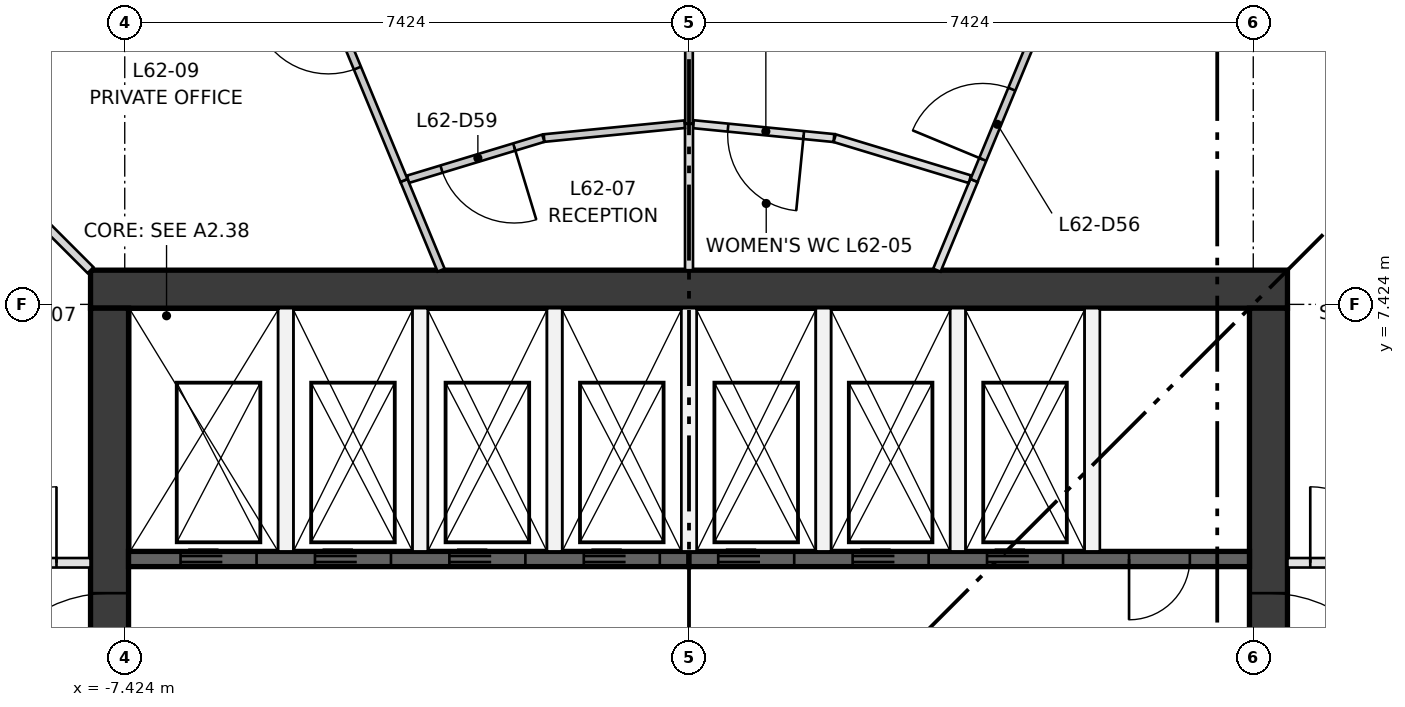
"""IFC4 building model, lengths in metres.
Left out: names, types, materials, properties, quantities, classifications, styles, units other than length and angle.
Written with IfcOpenShell. Run it as: python <this file> out.ifc"""

import sys

from ifc_helpers import new_model, si_unit, direction, frame, frame_2d, origin, place, context, subcontext, project, spatial, rectangle, extrude, element, fill, save


model = new_model("IFC4")
c1 = context("Model", 3, precision=1e-05, world=origin(), true_north=direction((0.0, 1.0)))
c2 = subcontext(c1, "Body", "Model", "MODEL_VIEW")
j1 = project(units=[si_unit("LENGTHUNIT", "METRE"), si_unit("PLANEANGLEUNIT", "RADIAN")], contexts=[c1])
p1 = place(None, origin())
s1 = spatial("IfcSite", under=j1, at=p1, CompositionType="ELEMENT")
p2 = place(p1, origin())
s2 = spatial("IfcBuilding", under=s1, at=p2, CompositionType="ELEMENT")
p3 = place(p2, frame((0.0, 0.0, 227.85)))
s3 = spatial("IfcBuildingStorey", under=s2, at=p3, CompositionType="ELEMENT", Elevation=227.85)
p4 = place(p3, frame((-7.874, 7.624, 0.0), z_axis=(0.0, 0.0, 1.0), x_axis=(1.0, 0.0, 0.0)))
e1 = element("IfcWall", 1, at=p4, inside=s3, PredefinedType="SHEAR", context=c2, shape_type="SweptSolid", body=[
    extrude(rectangle(XDim=15.748, YDim=0.5, at=frame_2d((7.874, 0.0))), origin(), (0.0, 0.0, 1.0), 3.35),
])
p5 = place(p3, frame((-7.624, -7.374, 0.0), z_axis=(0.0, 0.0, 1.0), x_axis=(0.0, 1.0, 0.0)))
e2 = element("IfcWall", 2, at=p5, inside=s3, PredefinedType="SHEAR", context=c2, shape_type="SweptSolid", body=[
    extrude(rectangle(XDim=14.748, YDim=0.5, at=frame_2d((7.374, 0.0))), origin(), (0.0, 0.0, 1.0), 3.35),
])
p6 = place(p5, frame((6.874, 0.0, 0.0)))
e3 = element("IfcOpeningElement", 3, at=p6, cuts=e2, PredefinedType="OPENING", context=c2, shape_type="SweptSolid", body=[
    extrude(rectangle(XDim=1.0, YDim=2.1, at=frame_2d((0.5, 1.05))), frame((0.0, 0.26, 0.0), z_axis=(0.0, -1.0, 0.0), x_axis=(1.0, 0.0, 0.0)), (0.0, 0.0, 1.0), 0.52),
])
p7 = place(p5, frame((3.75, 0.0, 0.0)))
e4 = element("IfcOpeningElement", 4, at=p7, cuts=e2, PredefinedType="OPENING", context=c2, shape_type="SweptSolid", body=[
    extrude(rectangle(XDim=1.8, YDim=2.1, at=frame_2d((0.9, 1.05))), frame((0.0, 0.26, 0.0), z_axis=(0.0, -1.0, 0.0), x_axis=(1.0, 0.0, 0.0)), (0.0, 0.0, 1.0), 0.52),
])
p8 = place(p5, frame((9.198, 0.0, 0.0)))
e5 = element("IfcOpeningElement", 5, at=p8, cuts=e2, PredefinedType="OPENING", context=c2, shape_type="SweptSolid", body=[
    extrude(rectangle(XDim=1.8, YDim=2.1, at=frame_2d((0.9, 1.05))), frame((0.0, 0.26, 0.0), z_axis=(0.0, -1.0, 0.0), x_axis=(1.0, 0.0, 0.0)), (0.0, 0.0, 1.0), 0.52),
])
p9 = place(p3, frame((7.624, -7.374, 0.0), z_axis=(0.0, 0.0, 1.0), x_axis=(0.0, 1.0, 0.0)))
e6 = element("IfcWall", 6, at=p9, inside=s3, PredefinedType="SHEAR", context=c2, shape_type="SweptSolid", body=[
    extrude(rectangle(XDim=14.748, YDim=0.5, at=frame_2d((7.374, 0.0))), origin(), (0.0, 0.0, 1.0), 3.35),
])
p10 = place(p9, frame((6.874, 0.0, 0.0)))
e7 = element("IfcOpeningElement", 7, at=p10, cuts=e6, PredefinedType="OPENING", context=c2, shape_type="SweptSolid", body=[
    extrude(rectangle(XDim=1.0, YDim=2.1, at=frame_2d((0.5, 1.05))), frame((0.0, 0.26, 0.0), z_axis=(0.0, -1.0, 0.0), x_axis=(1.0, 0.0, 0.0)), (0.0, 0.0, 1.0), 0.52),
])
p11 = place(p9, frame((3.75, 0.0, 0.0)))
e8 = element("IfcOpeningElement", 8, at=p11, cuts=e6, PredefinedType="OPENING", context=c2, shape_type="SweptSolid", body=[
    extrude(rectangle(XDim=1.8, YDim=2.1, at=frame_2d((0.9, 1.05))), frame((0.0, 0.26, 0.0), z_axis=(0.0, -1.0, 0.0), x_axis=(1.0, 0.0, 0.0)), (0.0, 0.0, 1.0), 0.52),
])
p12 = place(p9, frame((9.198, 0.0, 0.0)))
e9 = element("IfcOpeningElement", 9, at=p12, cuts=e6, PredefinedType="OPENING", context=c2, shape_type="SweptSolid", body=[
    extrude(rectangle(XDim=1.8, YDim=2.1, at=frame_2d((0.9, 1.05))), frame((0.0, 0.26, 0.0), z_axis=(0.0, -1.0, 0.0), x_axis=(1.0, 0.0, 0.0)), (0.0, 0.0, 1.0), 0.52),
])
p13 = place(p3, frame((-7.374, 4.074, 0.0), z_axis=(0.0, 0.0, 1.0), x_axis=(1.0, 0.0, 0.0)))
e10 = element("IfcWall", 10, at=p13, inside=s3, PredefinedType="SHEAR", context=c2, shape_type="SweptSolid", body=[
    extrude(rectangle(XDim=7.374, YDim=0.2, at=frame_2d((3.687, 0.0))), origin(), (0.0, 0.0, 1.0), 3.0),
])
p14 = place(p13, frame((0.684, 0.0, 0.0)))
e11 = element("IfcOpeningElement", 11, at=p14, cuts=e10, PredefinedType="OPENING", context=c2, shape_type="SweptSolid", body=[
    extrude(rectangle(XDim=1.0, YDim=2.1, at=frame_2d((0.5, 1.05))), frame((0.0, 0.11, 0.0), z_axis=(0.0, -1.0, 0.0), x_axis=(1.0, 0.0, 0.0)), (0.0, 0.0, 1.0), 0.22),
])
p15 = place(p13, frame((2.453, 0.0, 0.0)))
e12 = element("IfcOpeningElement", 12, at=p15, cuts=e10, PredefinedType="OPENING", context=c2, shape_type="SweptSolid", body=[
    extrude(rectangle(XDim=1.0, YDim=2.1, at=frame_2d((0.5, 1.05))), frame((0.0, 0.11, 0.0), z_axis=(0.0, -1.0, 0.0), x_axis=(1.0, 0.0, 0.0)), (0.0, 0.0, 1.0), 0.22),
])
p16 = place(p13, frame((4.221, 0.0, 0.0)))
e13 = element("IfcOpeningElement", 13, at=p16, cuts=e10, PredefinedType="OPENING", context=c2, shape_type="SweptSolid", body=[
    extrude(rectangle(XDim=1.0, YDim=2.1, at=frame_2d((0.5, 1.05))), frame((0.0, 0.11, 0.0), z_axis=(0.0, -1.0, 0.0), x_axis=(1.0, 0.0, 0.0)), (0.0, 0.0, 1.0), 0.22),
])
p17 = place(p13, frame((5.99, 0.0, 0.0)))
e14 = element("IfcOpeningElement", 14, at=p17, cuts=e10, PredefinedType="OPENING", context=c2, shape_type="SweptSolid", body=[
    extrude(rectangle(XDim=1.0, YDim=2.1, at=frame_2d((0.5, 1.05))), frame((0.0, 0.11, 0.0), z_axis=(0.0, -1.0, 0.0), x_axis=(1.0, 0.0, 0.0)), (0.0, 0.0, 1.0), 0.22),
])
p18 = place(p3, frame((0.0, 4.074, 0.0), z_axis=(0.0, 0.0, 1.0), x_axis=(1.0, 0.0, 0.0)))
e15 = element("IfcWall", 15, at=p18, inside=s3, PredefinedType="SHEAR", context=c2, shape_type="SweptSolid", body=[
    extrude(rectangle(XDim=7.374, YDim=0.2, at=frame_2d((3.687, 0.0))), origin(), (0.0, 0.0, 1.0), 3.0),
])
p19 = place(p18, frame((0.384, 0.0, 0.0)))
e16 = element("IfcOpeningElement", 16, at=p19, cuts=e15, PredefinedType="OPENING", context=c2, shape_type="SweptSolid", body=[
    extrude(rectangle(XDim=1.0, YDim=2.1, at=frame_2d((0.5, 1.05))), frame((0.0, 0.11, 0.0), z_axis=(0.0, -1.0, 0.0), x_axis=(1.0, 0.0, 0.0)), (0.0, 0.0, 1.0), 0.22),
])
p20 = place(p18, frame((2.153, 0.0, 0.0)))
e17 = element("IfcOpeningElement", 17, at=p20, cuts=e15, PredefinedType="OPENING", context=c2, shape_type="SweptSolid", body=[
    extrude(rectangle(XDim=1.0, YDim=2.1, at=frame_2d((0.5, 1.05))), frame((0.0, 0.11, 0.0), z_axis=(0.0, -1.0, 0.0), x_axis=(1.0, 0.0, 0.0)), (0.0, 0.0, 1.0), 0.22),
])
p21 = place(p18, frame((3.921, 0.0, 0.0)))
e18 = element("IfcOpeningElement", 18, at=p21, cuts=e15, PredefinedType="OPENING", context=c2, shape_type="SweptSolid", body=[
    extrude(rectangle(XDim=1.0, YDim=2.1, at=frame_2d((0.5, 1.05))), frame((0.0, 0.11, 0.0), z_axis=(0.0, -1.0, 0.0), x_axis=(1.0, 0.0, 0.0)), (0.0, 0.0, 1.0), 0.22),
])
p22 = place(p18, frame((5.79, 0.0, 0.0)))
e19 = element("IfcOpeningElement", 19, at=p22, cuts=e15, PredefinedType="OPENING", context=c2, shape_type="SweptSolid", body=[
    extrude(rectangle(XDim=0.8, YDim=2.1, at=frame_2d((0.4, 1.05))), frame((0.0, 0.11, 0.0), z_axis=(0.0, -1.0, 0.0), x_axis=(1.0, 0.0, 0.0)), (0.0, 0.0, 1.0), 0.22),
])
for number, where, z_axis, x_axis in (
    (20, (-5.305, 4.174, 0.0), (0.0, 0.0, 1.0), (0.0, 1.0, 0.0)),
    (21, (-3.537, 4.174, 0.0), (0.0, 0.0, 1.0), (0.0, 1.0, 0.0)),
    (22, (-1.769, 4.174, 0.0), (0.0, 0.0, 1.0), (0.0, 1.0, 0.0)),
    (23, (0.0, 4.174, 0.0), (0.0, 0.0, 1.0), (0.0, 1.0, 0.0)),
    (24, (1.769, 4.174, 0.0), (0.0, 0.0, 1.0), (0.0, 1.0, 0.0)),
    (25, (3.537, 4.174, 0.0), (0.0, 0.0, 1.0), (0.0, 1.0, 0.0)),
    (26, (5.305, 4.174, 0.0), (0.0, 0.0, 1.0), (0.0, 1.0, 0.0)),
):
    element("IfcWall", number, at=place(p3, frame(where, z_axis=z_axis, x_axis=x_axis)), inside=s3, PredefinedType="PARTITIONING", context=c2, shape_type="SweptSolid", body=[
        extrude(rectangle(XDim=3.2, YDim=0.2, at=frame_2d((1.6, 0.0))), origin(), (0.0, 0.0, 1.0), 3.0),
    ])
for number, where, z_axis, x_axis in (
    (27, (10.07, 10.726, 0.0), (0.0, 0.0, 1.0), (-0.773, 0.634, 0.0)),
    (28, (-8.206, 12.254, 0.0), (0.0, 0.0, 1.0), (-0.773, -0.634, 0.0)),
):
    element("IfcWall", number, at=place(p3, frame(where, z_axis=z_axis, x_axis=x_axis)), inside=s3, PredefinedType="SOLIDWALL", context=c2, shape_type="SweptSolid", body=[
        extrude(rectangle(XDim=2.411, YDim=0.3, at=frame_2d((1.206, 0.0))), origin(), (0.0, 0.0, 1.0), 0.9),
    ])
p23 = place(p3, frame((7.874, 4.024, 0.0), z_axis=(0.0, 0.0, 1.0), x_axis=(1.0, 0.0, 0.0)))
e29 = element("IfcWall", 29, at=p23, inside=s3, PredefinedType="PARTITIONING", context=c2, shape_type="SweptSolid", body=[
    extrude(rectangle(XDim=2.159, YDim=0.125, at=frame_2d((1.08, 0.0))), origin(), (0.0, 0.0, 1.0), 3.0),
])
p24 = place(p23, frame((0.3, 0.0, 0.0)))
e30 = element("IfcOpeningElement", 30, at=p24, cuts=e29, PredefinedType="OPENING", context=c2, shape_type="SweptSolid", body=[
    extrude(rectangle(XDim=1.0, YDim=2.1, at=frame_2d((0.5, 1.05))), frame((0.0, 0.073, 0.0), z_axis=(0.0, -1.0, 0.0), x_axis=(1.0, 0.0, 0.0)), (0.0, 0.0, 1.0), 0.145),
])
p25 = place(p3, frame((-9.822, 4.024, 0.0), z_axis=(0.0, 0.0, 1.0), x_axis=(1.0, 0.0, 0.0)))
e31 = element("IfcWall", 31, at=p25, inside=s3, PredefinedType="PARTITIONING", context=c2, shape_type="SweptSolid", body=[
    extrude(rectangle(XDim=1.948, YDim=0.125, at=frame_2d((0.974, 0.0))), origin(), (0.0, 0.0, 1.0), 3.0),
])
p26 = place(p25, frame((0.5, 0.0, 0.0)))
e32 = element("IfcOpeningElement", 32, at=p26, cuts=e31, PredefinedType="OPENING", context=c2, shape_type="SweptSolid", body=[
    extrude(rectangle(XDim=1.0, YDim=2.1, at=frame_2d((0.5, 1.05))), frame((0.0, 0.073, 0.0), z_axis=(0.0, -1.0, 0.0), x_axis=(1.0, 0.0, 0.0)), (0.0, 0.0, 1.0), 0.145),
])
p27 = place(p3, frame((3.261, 7.874, 0.0), z_axis=(0.0, 0.0, 1.0), x_axis=(0.382700703766, 0.923872378273, 0.0)))
e33 = element("IfcWall", 33, at=p27, inside=s3, PredefinedType="PARTITIONING", context=c2, shape_type="SweptSolid", body=[
    extrude(rectangle(XDim=1.277, YDim=0.105, at=frame_2d((0.639, 0.0))), origin(), (0.0, 0.0, 1.0), 3.0),
])
p28 = place(p3, frame((3.75, 9.054, 0.0), z_axis=(0.0, 0.0, 1.0), x_axis=(0.382718911932, 0.923864835595, 0.0)))
e34 = element("IfcWall", 34, at=p28, inside=s3, PredefinedType="PARTITIONING", context=c2, shape_type="SweptSolid", body=[
    extrude(rectangle(XDim=4.17, YDim=0.1, at=frame_2d((2.085, 0.0))), origin(), (0.0, 0.0, 1.0), 3.0),
])
p29 = place(p28, frame((0.3, 0.0, 0.0)))
e35 = element("IfcOpeningElement", 35, at=p29, cuts=e34, PredefinedType="OPENING", context=c2, shape_type="SweptSolid", body=[
    extrude(rectangle(XDim=1.0, YDim=2.1, at=frame_2d((0.5, 1.05))), frame((0.0, 0.06, 0.0), z_axis=(0.0, -1.0, 0.0), x_axis=(1.0, 0.0, 0.0)), (0.0, 0.0, 1.0), 0.12),
])
p30 = place(p3, frame((1.907, 9.612, 0.0), z_axis=(0.0, 0.0, 1.0), x_axis=(-0.99519720103, 0.097890403323, 0.0)))
e36 = element("IfcWall", 36, at=p30, inside=s3, PredefinedType="PARTITIONING", context=c2, shape_type="SweptSolid", body=[
    extrude(rectangle(XDim=1.858, YDim=0.105, at=frame_2d((0.929, 0.0))), origin(), (0.0, 0.0, 1.0), 3.0),
])
p31 = place(p30, frame((0.4, 0.0, 0.0)))
e37 = element("IfcOpeningElement", 37, at=p31, cuts=e36, PredefinedType="OPENING", context=c2, shape_type="SweptSolid", body=[
    extrude(rectangle(XDim=1.0, YDim=2.1, at=frame_2d((0.5, 1.05))), frame((0.0, 0.062, 0.0), z_axis=(0.0, -1.0, 0.0), x_axis=(1.0, 0.0, 0.0)), (0.0, 0.0, 1.0), 0.125),
])
p32 = place(p3, frame((1.917, 9.61, 0.0), z_axis=(0.0, 0.0, 1.0), x_axis=(0.956950332284, -0.290251720996, 0.0)))
e38 = element("IfcWall", 38, at=p32, inside=s3, PredefinedType="PARTITIONING", context=c2, shape_type="SweptSolid", body=[
    extrude(rectangle(XDim=1.858, YDim=0.105, at=frame_2d((0.929, 0.0))), origin(), (0.0, 0.0, 1.0), 3.0),
])
p33 = place(p3, frame((0.0, 7.874, 0.0), z_axis=(0.0, 0.0, 1.0), x_axis=(0.0, 1.0, 0.0)))
e39 = element("IfcWall", 39, at=p33, inside=s3, PredefinedType="PARTITIONING", context=c2, shape_type="SweptSolid", body=[
    extrude(rectangle(XDim=1.926, YDim=0.105, at=frame_2d((0.963, 0.0))), origin(), (0.0, 0.0, 1.0), 3.0),
])
p34 = place(p3, frame((0.0, 9.8, 0.0), z_axis=(0.0, 0.0, 1.0), x_axis=(0.0, 1.0, 0.0)))
e40 = element("IfcWall", 40, at=p34, inside=s3, PredefinedType="PARTITIONING", context=c2, shape_type="SweptSolid", body=[
    extrude(rectangle(XDim=4.17, YDim=0.1, at=frame_2d((2.085, 0.0))), origin(), (0.0, 0.0, 1.0), 3.0),
])
p35 = place(p34, frame((1.6, 0.0, 0.0)))
e41 = element("IfcOpeningElement", 41, at=p35, cuts=e40, PredefinedType="OPENING", context=c2, shape_type="SweptSolid", body=[
    extrude(rectangle(XDim=1.0, YDim=2.1, at=frame_2d((0.5, 1.05))), frame((0.0, 0.06, 0.0), z_axis=(0.0, -1.0, 0.0), x_axis=(1.0, 0.0, 0.0)), (0.0, 0.0, 1.0), 0.12),
])
p36 = place(p3, frame((-1.917, 9.61, 0.0), z_axis=(0.0, 0.0, 1.0), x_axis=(-0.956937203992, -0.290295001019, 0.0)))
e42 = element("IfcWall", 42, at=p36, inside=s3, PredefinedType="PARTITIONING", context=c2, shape_type="SweptSolid", body=[
    extrude(rectangle(XDim=1.861, YDim=0.1, at=frame_2d((0.931, 0.0))), origin(), (0.0, 0.0, 1.0), 3.0),
])
p37 = place(p36, frame((0.4, 0.0, 0.0)))
e43 = element("IfcOpeningElement", 43, at=p37, cuts=e42, PredefinedType="OPENING", context=c2, shape_type="SweptSolid", body=[
    extrude(rectangle(XDim=1.0, YDim=2.1, at=frame_2d((0.5, 1.05))), frame((0.0, 0.06, 0.0), z_axis=(0.0, -1.0, 0.0), x_axis=(1.0, 0.0, 0.0)), (0.0, 0.0, 1.0), 0.12),
])
p38 = place(p3, frame((-1.907, 9.612, 0.0), z_axis=(0.0, 0.0, 1.0), x_axis=(0.995199718264, 0.09786480862, 0.0)))
e44 = element("IfcWall", 44, at=p38, inside=s3, PredefinedType="PARTITIONING", context=c2, shape_type="SweptSolid", body=[
    extrude(rectangle(XDim=1.859, YDim=0.1, at=frame_2d((0.929, 0.0))), origin(), (0.0, 0.0, 1.0), 3.0),
])
p39 = place(p3, frame((-3.261, 7.874, 0.0), z_axis=(0.0, 0.0, 1.0), x_axis=(-0.382700703766, 0.923872378273, 0.0)))
e45 = element("IfcWall", 45, at=p39, inside=s3, PredefinedType="PARTITIONING", context=c2, shape_type="SweptSolid", body=[
    extrude(rectangle(XDim=1.277, YDim=0.1, at=frame_2d((0.639, 0.0))), origin(), (0.0, 0.0, 1.0), 3.0),
])
p40 = place(p3, frame((-3.75, 9.054, 0.0), z_axis=(0.0, 0.0, 1.0), x_axis=(-0.382718911932, 0.923864835595, 0.0)))
e46 = element("IfcWall", 46, at=p40, inside=s3, PredefinedType="PARTITIONING", context=c2, shape_type="SweptSolid", body=[
    extrude(rectangle(XDim=4.17, YDim=0.1, at=frame_2d((2.085, 0.0))), origin(), (0.0, 0.0, 1.0), 3.0),
])
p41 = place(p40, frame((1.6, 0.0, 0.0)))
e47 = element("IfcOpeningElement", 47, at=p41, cuts=e46, PredefinedType="OPENING", context=c2, shape_type="SweptSolid", body=[
    extrude(rectangle(XDim=1.0, YDim=2.1, at=frame_2d((0.5, 1.05))), frame((0.0, 0.06, 0.0), z_axis=(0.0, -1.0, 0.0), x_axis=(1.0, 0.0, 0.0)), (0.0, 0.0, 1.0), 0.12),
])
p42 = place(p3, frame((-7.874, 7.874, 0.0), z_axis=(0.0, 0.0, 1.0), x_axis=(-0.707106781187, 0.707106781187, 0.0)))
e48 = element("IfcWall", 48, at=p42, inside=s3, PredefinedType="PARTITIONING", context=c2, shape_type="SweptSolid", body=[
    extrude(rectangle(XDim=2.835, YDim=0.11, at=frame_2d((1.417, 0.0))), origin(), (0.0, 0.0, 1.0), 3.0),
])
p43 = place(p14, frame((1.0, 0.0, 0.0), z_axis=(0.0, 0.0, 1.0), x_axis=(-1.0, 0.0, 0.0)))
e49 = element("IfcDoor", 49, at=p43, inside=s3, OperationType="DOUBLE_DOOR_SLIDING", PredefinedType="DOOR", context=c2, shape_type="SweptSolid", body=[
    extrude(rectangle(XDim=1.0, YDim=2.1, at=frame_2d((0.5, 1.05))), frame((0.0, 0.025, 0.0), z_axis=(0.0, -1.0, 0.0), x_axis=(1.0, 0.0, 0.0)), (0.0, 0.0, 1.0), 0.05),
])
fill(e11, e49)
p44 = place(p15, frame((1.0, 0.0, 0.0), z_axis=(0.0, 0.0, 1.0), x_axis=(-1.0, 0.0, 0.0)))
e50 = element("IfcDoor", 50, at=p44, inside=s3, OperationType="DOUBLE_DOOR_SLIDING", PredefinedType="DOOR", context=c2, shape_type="SweptSolid", body=[
    extrude(rectangle(XDim=1.0, YDim=2.1, at=frame_2d((0.5, 1.05))), frame((0.0, 0.025, 0.0), z_axis=(0.0, -1.0, 0.0), x_axis=(1.0, 0.0, 0.0)), (0.0, 0.0, 1.0), 0.05),
])
fill(e12, e50)
p45 = place(p16, frame((1.0, 0.0, 0.0), z_axis=(0.0, 0.0, 1.0), x_axis=(-1.0, 0.0, 0.0)))
e51 = element("IfcDoor", 51, at=p45, inside=s3, OperationType="DOUBLE_DOOR_SLIDING", PredefinedType="DOOR", context=c2, shape_type="SweptSolid", body=[
    extrude(rectangle(XDim=1.0, YDim=2.1, at=frame_2d((0.5, 1.05))), frame((0.0, 0.025, 0.0), z_axis=(0.0, -1.0, 0.0), x_axis=(1.0, 0.0, 0.0)), (0.0, 0.0, 1.0), 0.05),
])
fill(e13, e51)
p46 = place(p17, frame((1.0, 0.0, 0.0), z_axis=(0.0, 0.0, 1.0), x_axis=(-1.0, 0.0, 0.0)))
e52 = element("IfcDoor", 52, at=p46, inside=s3, OperationType="DOUBLE_DOOR_SLIDING", PredefinedType="DOOR", context=c2, shape_type="SweptSolid", body=[
    extrude(rectangle(XDim=1.0, YDim=2.1, at=frame_2d((0.5, 1.05))), frame((0.0, 0.025, 0.0), z_axis=(0.0, -1.0, 0.0), x_axis=(1.0, 0.0, 0.0)), (0.0, 0.0, 1.0), 0.05),
])
fill(e14, e52)
p47 = place(p19, frame((1.0, 0.0, 0.0), z_axis=(0.0, 0.0, 1.0), x_axis=(-1.0, 0.0, 0.0)))
e53 = element("IfcDoor", 53, at=p47, inside=s3, OperationType="DOUBLE_DOOR_SLIDING", PredefinedType="DOOR", context=c2, shape_type="SweptSolid", body=[
    extrude(rectangle(XDim=1.0, YDim=2.1, at=frame_2d((0.5, 1.05))), frame((0.0, 0.025, 0.0), z_axis=(0.0, -1.0, 0.0), x_axis=(1.0, 0.0, 0.0)), (0.0, 0.0, 1.0), 0.05),
])
fill(e16, e53)
p48 = place(p20, frame((1.0, 0.0, 0.0), z_axis=(0.0, 0.0, 1.0), x_axis=(-1.0, 0.0, 0.0)))
e54 = element("IfcDoor", 54, at=p48, inside=s3, OperationType="DOUBLE_DOOR_SLIDING", PredefinedType="DOOR", context=c2, shape_type="SweptSolid", body=[
    extrude(rectangle(XDim=1.0, YDim=2.1, at=frame_2d((0.5, 1.05))), frame((0.0, 0.025, 0.0), z_axis=(0.0, -1.0, 0.0), x_axis=(1.0, 0.0, 0.0)), (0.0, 0.0, 1.0), 0.05),
])
fill(e17, e54)
p49 = place(p21, frame((1.0, 0.0, 0.0), z_axis=(0.0, 0.0, 1.0), x_axis=(-1.0, 0.0, 0.0)))
e55 = element("IfcDoor", 55, at=p49, inside=s3, OperationType="DOUBLE_DOOR_SLIDING", PredefinedType="DOOR", context=c2, shape_type="SweptSolid", body=[
    extrude(rectangle(XDim=1.0, YDim=2.1, at=frame_2d((0.5, 1.05))), frame((0.0, 0.025, 0.0), z_axis=(0.0, -1.0, 0.0), x_axis=(1.0, 0.0, 0.0)), (0.0, 0.0, 1.0), 0.05),
])
fill(e18, e55)
p50 = place(p22, frame((0.8, 0.0, 0.0), z_axis=(0.0, 0.0, 1.0), x_axis=(-1.0, 0.0, 0.0)))
e56 = element("IfcDoor", 56, at=p50, inside=s3, OperationType="SINGLE_SWING_LEFT", PredefinedType="DOOR", context=c2, shape_type="SweptSolid", body=[
    extrude(rectangle(XDim=0.8, YDim=2.1, at=frame_2d((0.4, 1.05))), frame((0.0, 0.025, 0.0), z_axis=(0.0, -1.0, 0.0), x_axis=(1.0, 0.0, 0.0)), (0.0, 0.0, 1.0), 0.05),
])
fill(e19, e56)
p51 = place(p8, origin())
e57 = element("IfcDoor", 57, at=p51, inside=s3, OperationType="DOUBLE_DOOR_SINGLE_SWING", PredefinedType="DOOR", context=c2, shape_type="SweptSolid", body=[
    extrude(rectangle(XDim=1.8, YDim=2.1, at=frame_2d((0.9, 1.05))), frame((0.0, 0.025, 0.0), z_axis=(0.0, -1.0, 0.0), x_axis=(1.0, 0.0, 0.0)), (0.0, 0.0, 1.0), 0.05),
])
fill(e5, e57)
p52 = place(p12, frame((1.8, 0.0, 0.0), z_axis=(0.0, 0.0, 1.0), x_axis=(-1.0, 0.0, 0.0)))
e58 = element("IfcDoor", 58, at=p52, inside=s3, OperationType="DOUBLE_DOOR_SINGLE_SWING", PredefinedType="DOOR", context=c2, shape_type="SweptSolid", body=[
    extrude(rectangle(XDim=1.8, YDim=2.1, at=frame_2d((0.9, 1.05))), frame((0.0, 0.025, 0.0), z_axis=(0.0, -1.0, 0.0), x_axis=(1.0, 0.0, 0.0)), (0.0, 0.0, 1.0), 0.05),
])
fill(e9, e58)
p53 = place(p24, origin())
e59 = element("IfcDoor", 59, at=p53, inside=s3, OperationType="SINGLE_SWING_LEFT", PredefinedType="DOOR", context=c2, shape_type="SweptSolid", body=[
    extrude(rectangle(XDim=1.0, YDim=2.1, at=frame_2d((0.5, 1.05))), frame((0.0, 0.025, 0.0), z_axis=(0.0, -1.0, 0.0), x_axis=(1.0, 0.0, 0.0)), (0.0, 0.0, 1.0), 0.05),
])
fill(e30, e59)
p54 = place(p26, origin())
e60 = element("IfcDoor", 60, at=p54, inside=s3, OperationType="SINGLE_SWING_RIGHT", PredefinedType="DOOR", context=c2, shape_type="SweptSolid", body=[
    extrude(rectangle(XDim=1.0, YDim=2.1, at=frame_2d((0.5, 1.05))), frame((0.0, 0.025, 0.0), z_axis=(0.0, -1.0, 0.0), x_axis=(1.0, 0.0, 0.0)), (0.0, 0.0, 1.0), 0.05),
])
fill(e32, e60)
p55 = place(p29, origin())
e61 = element("IfcDoor", 61, at=p55, inside=s3, OperationType="SINGLE_SWING_LEFT", PredefinedType="DOOR", context=c2, shape_type="SweptSolid", body=[
    extrude(rectangle(XDim=1.0, YDim=2.1, at=frame_2d((0.5, 1.05))), frame((0.0, 0.025, 0.0), z_axis=(0.0, -1.0, 0.0), x_axis=(1.0, 0.0, 0.0)), (0.0, 0.0, 1.0), 0.05),
])
fill(e35, e61)
p56 = place(p31, origin())
e62 = element("IfcDoor", 62, at=p56, inside=s3, OperationType="SINGLE_SWING_LEFT", PredefinedType="DOOR", context=c2, shape_type="SweptSolid", body=[
    extrude(rectangle(XDim=1.0, YDim=2.1, at=frame_2d((0.5, 1.05))), frame((0.0, 0.025, 0.0), z_axis=(0.0, -1.0, 0.0), x_axis=(1.0, 0.0, 0.0)), (0.0, 0.0, 1.0), 0.05),
])
fill(e37, e62)
p57 = place(p37, origin())
e63 = element("IfcDoor", 63, at=p57, inside=s3, OperationType="SINGLE_SWING_LEFT", PredefinedType="DOOR", context=c2, shape_type="SweptSolid", body=[
    extrude(rectangle(XDim=1.0, YDim=2.1, at=frame_2d((0.5, 1.05))), frame((0.0, 0.025, 0.0), z_axis=(0.0, -1.0, 0.0), x_axis=(1.0, 0.0, 0.0)), (0.0, 0.0, 1.0), 0.05),
])
fill(e43, e63)
p58 = place(p41, origin())
e64 = element("IfcDoor", 64, at=p58, inside=s3, OperationType="SINGLE_SWING_RIGHT", PredefinedType="DOOR", context=c2, shape_type="SweptSolid", body=[
    extrude(rectangle(XDim=1.0, YDim=2.1, at=frame_2d((0.5, 1.05))), frame((0.0, 0.025, 0.0), z_axis=(0.0, -1.0, 0.0), x_axis=(1.0, 0.0, 0.0)), (0.0, 0.0, 1.0), 0.05),
])
fill(e47, e64)
save(model, sys.argv[1])
